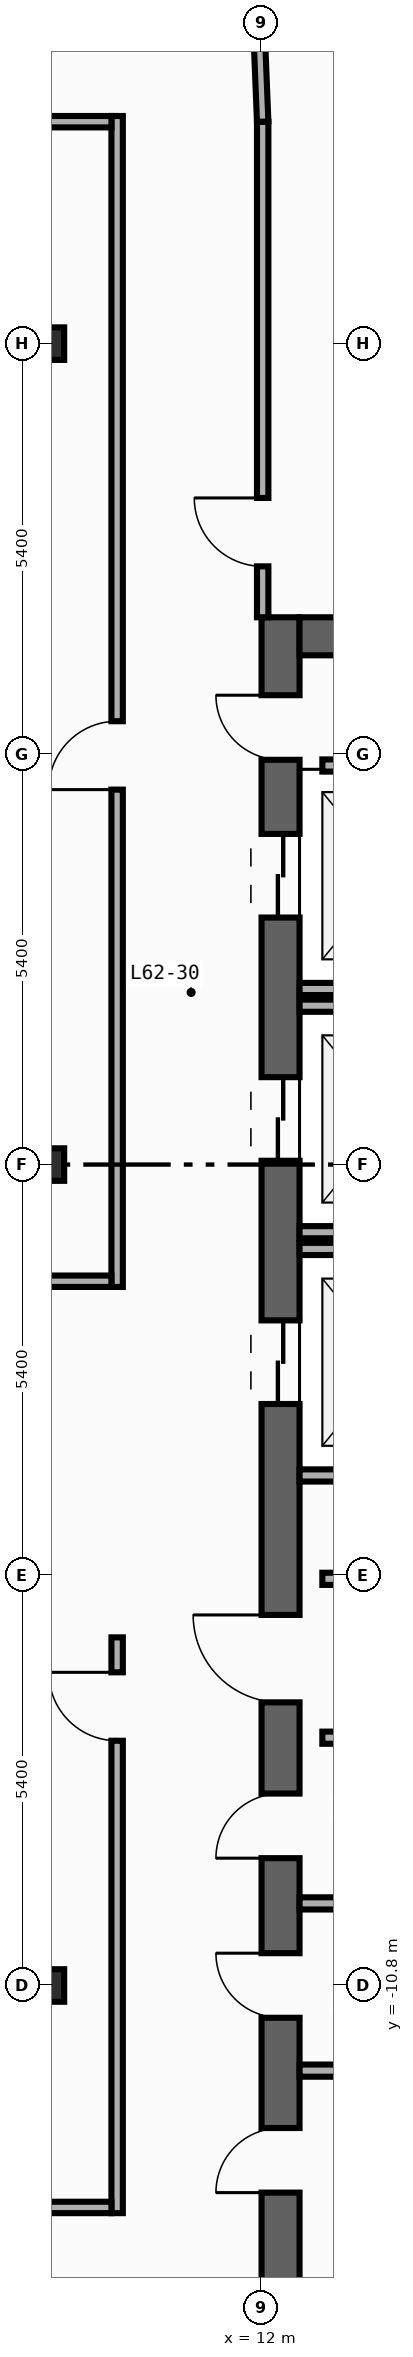
"""IFC4 building model, lengths in metres.
Left out: names, types, materials, properties, quantities, classifications, styles, units other than length and angle.
Written with IfcOpenShell. Run it as: python <this file> out.ifc"""

import sys

from ifc_helpers import new_model, si_unit, direction, frame, frame_2d, origin, origin_2d, place, context, subcontext, project, spatial, rectangle, i_section, extrude, element, fill, save


model = new_model("IFC4")
c1 = context("Model", 3, precision=1e-05, world=origin(), true_north=direction((0.0, 1.0)))
c2 = subcontext(c1, "Body", "Model", "MODEL_VIEW")
j1 = project(units=[si_unit("LENGTHUNIT", "METRE"), si_unit("PLANEANGLEUNIT", "RADIAN")], contexts=[c1])
p1 = place(None, origin())
s1 = spatial("IfcSite", under=j1, at=p1, CompositionType="ELEMENT")
p2 = place(p1, origin())
s2 = spatial("IfcBuilding", under=s1, at=p2, CompositionType="ELEMENT")
p3 = place(p2, frame((0.0, 0.0, 262.0)))
s3 = spatial("IfcBuildingStorey", under=s2, at=p3, CompositionType="ELEMENT", Elevation=262.0)
p4 = place(p3, frame((12.25, -19.8, 0.0), z_axis=(0.0, 0.0, 1.0), x_axis=(0.0, 1.0, 0.0)))
e1 = element("IfcWall", 1, at=p4, inside=s3, PredefinedType="SHEAR", context=c2, shape_type="SweptSolid", body=[
    extrude(rectangle(XDim=27.0, YDim=0.5, at=frame_2d((13.5, 0.0))), origin(), (0.0, 0.0, 1.0), 3.34),
])
p5 = place(p4, frame((23.05, 0.0, 0.0)))
e2 = element("IfcOpeningElement", 2, at=p5, cuts=e1, PredefinedType="OPENING", context=c2, shape_type="SweptSolid", body=[
    extrude(rectangle(XDim=1.1, YDim=2.2, at=frame_2d((0.55, 1.1))), frame((0.0, 0.26, 0.0), z_axis=(0.0, -1.0, 0.0), x_axis=(1.0, 0.0, 0.0)), (0.0, 0.0, 1.0), 0.52),
])
p6 = place(p4, frame((19.85, 0.0, 0.0)))
e3 = element("IfcOpeningElement", 3, at=p6, cuts=e1, PredefinedType="OPENING", context=c2, shape_type="SweptSolid", body=[
    extrude(rectangle(XDim=1.1, YDim=2.2, at=frame_2d((0.55, 1.1))), frame((0.0, 0.26, 0.0), z_axis=(0.0, -1.0, 0.0), x_axis=(1.0, 0.0, 0.0)), (0.0, 0.0, 1.0), 0.52),
])
p7 = place(p4, frame((16.65, 0.0, 0.0)))
e4 = element("IfcOpeningElement", 4, at=p7, cuts=e1, PredefinedType="OPENING", context=c2, shape_type="SweptSolid", body=[
    extrude(rectangle(XDim=1.1, YDim=2.2, at=frame_2d((0.55, 1.1))), frame((0.0, 0.26, 0.0), z_axis=(0.0, -1.0, 0.0), x_axis=(1.0, 0.0, 0.0)), (0.0, 0.0, 1.0), 0.52),
])
p8 = place(p4, frame((6.275, 0.0, 0.0)))
e5 = element("IfcOpeningElement", 5, at=p8, cuts=e1, PredefinedType="OPENING", context=c2, shape_type="SweptSolid", body=[
    extrude(rectangle(XDim=0.85, YDim=2.1, at=frame_2d((0.425, 1.05))), frame((0.0, 0.26, 0.0), z_axis=(0.0, -1.0, 0.0), x_axis=(1.0, 0.0, 0.0)), (0.0, 0.0, 1.0), 0.52),
])
p9 = place(p4, frame((8.575, 0.0, 0.0)))
e6 = element("IfcOpeningElement", 6, at=p9, cuts=e1, PredefinedType="OPENING", context=c2, shape_type="SweptSolid", body=[
    extrude(rectangle(XDim=0.85, YDim=2.1, at=frame_2d((0.425, 1.05))), frame((0.0, 0.26, 0.0), z_axis=(0.0, -1.0, 0.0), x_axis=(1.0, 0.0, 0.0)), (0.0, 0.0, 1.0), 0.52),
])
p10 = place(p4, frame((10.675, 0.0, 0.0)))
e7 = element("IfcOpeningElement", 7, at=p10, cuts=e1, PredefinedType="OPENING", context=c2, shape_type="SweptSolid", body=[
    extrude(rectangle(XDim=0.85, YDim=2.1, at=frame_2d((0.425, 1.05))), frame((0.0, 0.26, 0.0), z_axis=(0.0, -1.0, 0.0), x_axis=(1.0, 0.0, 0.0)), (0.0, 0.0, 1.0), 0.52),
])
p11 = place(p4, frame((12.725, 0.0, 0.0)))
e8 = element("IfcOpeningElement", 8, at=p11, cuts=e1, PredefinedType="OPENING", context=c2, shape_type="SweptSolid", body=[
    extrude(rectangle(XDim=1.15, YDim=2.2, at=frame_2d((0.575, 1.1))), frame((0.0, 0.26, 0.0), z_axis=(0.0, -1.0, 0.0), x_axis=(1.0, 0.0, 0.0)), (0.0, 0.0, 1.0), 0.52),
])
p12 = place(p4, frame((25.125, 0.0, 0.0)))
e9 = element("IfcOpeningElement", 9, at=p12, cuts=e1, PredefinedType="OPENING", context=c2, shape_type="SweptSolid", body=[
    extrude(rectangle(XDim=0.85, YDim=2.1, at=frame_2d((0.425, 1.05))), frame((0.0, 0.26, 0.0), z_axis=(0.0, -1.0, 0.0), x_axis=(1.0, 0.0, 0.0)), (0.0, 0.0, 1.0), 0.52),
])
p13 = place(p3, frame((12.5, 6.95, 0.0), z_axis=(0.0, 0.0, 1.0), x_axis=(1.0, 0.0, 0.0)))
e10 = element("IfcWall", 10, at=p13, inside=s3, PredefinedType="SHEAR", context=c2, shape_type="SweptSolid", body=[
    extrude(rectangle(XDim=7.4, YDim=0.5, at=frame_2d((3.7, 0.0))), origin(), (0.0, 0.0, 1.0), 3.34),
])
for number, where, z_axis, x_axis in (
    (11, (9.2, -10.8, 0.0), (0.0, 0.0, 1.0), (1.0, 0.0, 0.0)),
    (12, (9.2, 0.0, 0.0), (0.0, 0.0, 1.0), (1.0, 0.0, 0.0)),
    (13, (9.2, 10.8, 0.0), (0.0, 0.0, 1.0), (1.0, 0.0, 0.0)),
):
    element("IfcColumn", number, at=place(p3, frame(where, z_axis=z_axis, x_axis=x_axis)), inside=s3, PredefinedType="COLUMN", context=c2, shape_type="SweptSolid", body=[
        extrude(i_section(OverallWidth=0.407, OverallDepth=0.428, WebThickness=0.02, FlangeThickness=0.035, FilletRadius=0.022, at=origin_2d()), origin(), (0.0, 0.0, 1.0), 3.6),
    ])
for number, where, z_axis, x_axis in (
    (14, (12.5, 2.31, 0.0), (0.0, 0.0, 1.0), (1.0, 0.0, 0.0)),
    (15, (12.5, -0.89, 0.0), (0.0, 0.0, 1.0), (1.0, 0.0, 0.0)),
    (16, (12.5, 2.09, 0.0), (0.0, 0.0, 1.0), (1.0, 0.0, 0.0)),
    (17, (12.5, -4.09, 0.0), (0.0, 0.0, 1.0), (1.0, 0.0, 0.0)),
    (18, (12.5, -1.11, 0.0), (0.0, 0.0, 1.0), (1.0, 0.0, 0.0)),
):
    element("IfcWall", number, at=place(p3, frame(where, z_axis=z_axis, x_axis=x_axis)), inside=s3, PredefinedType="STANDARD", context=c2, shape_type="SweptSolid", body=[
        extrude(rectangle(XDim=2.49, YDim=0.16, at=frame_2d((1.245, 0.0))), origin(), (0.0, 0.0, 1.0), 3.34),
    ])
for number, where, z_axis, x_axis in (
    (19, (12.8, -5.45, 0.0), (0.0, 0.0, 1.0), (1.0, 0.0, 0.0)),
    (20, (12.8, -7.54, 0.0), (0.0, 0.0, 1.0), (1.0, 0.0, 0.0)),
    (21, (12.8, 5.25, 0.0), (0.0, 0.0, 1.0), (1.0, 0.0, 0.0)),
):
    element("IfcWall", number, at=place(p3, frame(where, z_axis=z_axis, x_axis=x_axis)), inside=s3, PredefinedType="STANDARD", context=c2, shape_type="SweptSolid", body=[
        extrude(rectangle(XDim=2.6, YDim=0.16, at=frame_2d((1.3, 0.0))), origin(), (0.0, 0.0, 1.0), 3.34),
    ])
for number, where, z_axis, x_axis in (
    (22, (12.5, -11.92, 0.0), (0.0, 0.0, 1.0), (1.0, 0.0, 0.0)),
    (23, (12.5, -9.72, 0.0), (0.0, 0.0, 1.0), (1.0, 0.0, 0.0)),
):
    element("IfcWall", number, at=place(p3, frame(where, z_axis=z_axis, x_axis=x_axis)), inside=s3, PredefinedType="PARTITIONING", context=c2, shape_type="SweptSolid", body=[
        extrude(rectangle(XDim=2.9, YDim=0.16, at=frame_2d((1.45, 0.0))), origin(), (0.0, 0.0, 1.0), 3.34),
    ])
p14 = place(p3, frame((12.015, 7.2, 0.0), z_axis=(0.0, 0.0, 1.0), x_axis=(0.0, 1.0, 0.0)))
e24 = element("IfcWall", 24, at=p14, inside=s3, PredefinedType="PARTITIONING", context=c2, shape_type="SweptSolid", body=[
    extrude(rectangle(XDim=6.52, YDim=0.15, at=frame_2d((3.26, 0.0))), origin(), (0.0, 0.0, 1.0), 3.34),
])
p15 = place(p14, frame((0.67, 0.0, 0.0)))
e25 = element("IfcOpeningElement", 25, at=p15, cuts=e24, PredefinedType="OPENING", context=c2, shape_type="SweptSolid", body=[
    extrude(rectangle(XDim=0.9, YDim=2.15, at=frame_2d((0.45, 1.075))), frame((0.0, 0.085, 0.0), z_axis=(0.0, -1.0, 0.0), x_axis=(1.0, 0.0, 0.0)), (0.0, 0.0, 1.0), 0.17),
])
p16 = place(p3, frame((10.1, -1.61, 0.0), z_axis=(0.0, 0.0, 1.0), x_axis=(0.0, 1.0, 0.0)))
e26 = element("IfcWall", 26, at=p16, inside=s3, PredefinedType="PARTITIONING", context=c2, shape_type="SweptSolid", body=[
    extrude(rectangle(XDim=15.405, YDim=0.15, at=frame_2d((7.703, 0.0))), origin(), (0.0, 0.0, 1.0), 3.34),
])
p17 = place(p16, frame((6.543, 0.0, 0.0)))
e27 = element("IfcOpeningElement", 27, at=p17, cuts=e26, PredefinedType="OPENING", context=c2, shape_type="SweptSolid", body=[
    extrude(rectangle(XDim=0.9, YDim=2.15, at=frame_2d((0.45, 1.075))), frame((0.0, 0.085, 0.0), z_axis=(0.0, -1.0, 0.0), x_axis=(1.0, 0.0, 0.0)), (0.0, 0.0, 1.0), 0.17),
])
p18 = place(p3, frame((10.1, -13.795, 0.0), z_axis=(0.0, 0.0, 1.0), x_axis=(0.0, 1.0, 0.0)))
e28 = element("IfcWall", 28, at=p18, inside=s3, PredefinedType="PARTITIONING", context=c2, shape_type="SweptSolid", body=[
    extrude(rectangle(XDim=7.575, YDim=0.15, at=frame_2d((3.788, 0.0))), origin(), (0.0, 0.0, 1.0), 3.34),
])
p19 = place(p18, frame((6.215, 0.0, 0.0)))
e29 = element("IfcOpeningElement", 29, at=p19, cuts=e28, PredefinedType="OPENING", context=c2, shape_type="SweptSolid", body=[
    extrude(rectangle(XDim=0.9, YDim=2.15, at=frame_2d((0.45, 1.075))), frame((0.0, 0.085, 0.0), z_axis=(0.0, -1.0, 0.0), x_axis=(1.0, 0.0, 0.0)), (0.0, 0.0, 1.0), 0.17),
])
p20 = place(p3, frame((-1.81, -1.535, 0.0), z_axis=(0.0, 0.0, 1.0), x_axis=(1.0, 0.0, 0.0)))
e30 = element("IfcWall", 30, at=p20, inside=s3, PredefinedType="PARTITIONING", context=c2, shape_type="SweptSolid", body=[
    extrude(rectangle(XDim=11.835, YDim=0.15, at=frame_2d((5.917, 0.0))), origin(), (0.0, 0.0, 1.0), 3.34),
])
p21 = place(p20, frame((1.261, 0.0, 0.0)))
e31 = element("IfcOpeningElement", 31, at=p21, cuts=e30, PredefinedType="OPENING", context=c2, shape_type="SweptSolid", body=[
    extrude(rectangle(XDim=0.9, YDim=2.15, at=frame_2d((0.45, 1.075))), frame((0.0, 0.085, 0.0), z_axis=(0.0, -1.0, 0.0), x_axis=(1.0, 0.0, 0.0)), (0.0, 0.0, 1.0), 0.17),
])
p22 = place(p3, frame((12.015, 13.72, 0.0), z_axis=(0.0, 0.0, 1.0), x_axis=(-0.040046877756, 0.99919780203, 0.0)))
e32 = element("IfcWall", 32, at=p22, inside=s3, PredefinedType="PARTITIONING", context=c2, shape_type="SweptSolid", body=[
    extrude(rectangle(XDim=1.731, YDim=0.15, at=frame_2d((0.866, 0.0))), origin(), (0.0, 0.0, 1.0), 3.34),
])
p23 = place(p3, frame((-1.66, 13.72, 0.0), z_axis=(0.0, 0.0, 1.0), x_axis=(1.0, 0.0, 0.0)))
e33 = element("IfcWall", 33, at=p23, inside=s3, PredefinedType="PARTITIONING", context=c2, shape_type="SweptSolid", body=[
    extrude(rectangle(XDim=11.685, YDim=0.15, at=frame_2d((5.842, 0.0))), origin(), (0.0, 0.0, 1.0), 3.34),
])
p24 = place(p23, frame((3.48, 0.0, 0.0)))
e34 = element("IfcOpeningElement", 34, at=p24, cuts=e33, PredefinedType="OPENING", context=c2, shape_type="SweptSolid", body=[
    extrude(rectangle(XDim=0.9, YDim=2.15, at=frame_2d((0.45, 1.075))), frame((0.0, 0.085, 0.0), z_axis=(0.0, -1.0, 0.0), x_axis=(1.0, 0.0, 0.0)), (0.0, 0.0, 1.0), 0.17),
])
p25 = place(p3, frame((-1.83, -13.72, 0.0), z_axis=(0.0, 0.0, 1.0), x_axis=(1.0, 0.0, 0.0)))
e35 = element("IfcWall", 35, at=p25, inside=s3, PredefinedType="PARTITIONING", context=c2, shape_type="SweptSolid", body=[
    extrude(rectangle(XDim=11.855, YDim=0.15, at=frame_2d((5.927, 0.0))), origin(), (0.0, 0.0, 1.0), 3.34),
])
p26 = place(p25, frame((3.671, 0.0, 0.0)))
e36 = element("IfcOpeningElement", 36, at=p26, cuts=e35, PredefinedType="OPENING", context=c2, shape_type="SweptSolid", body=[
    extrude(rectangle(XDim=0.9, YDim=2.15, at=frame_2d((0.45, 1.075))), frame((0.0, 0.085, 0.0), z_axis=(0.0, -1.0, 0.0), x_axis=(1.0, 0.0, 0.0)), (0.0, 0.0, 1.0), 0.17),
])
p27 = place(p5, origin())
e37 = element("IfcDoor", 37, at=p27, inside=s3, OperationType="DOUBLE_DOOR_SLIDING", PredefinedType="DOOR", context=c2, shape_type="SweptSolid", body=[
    extrude(rectangle(XDim=1.1, YDim=2.2, at=frame_2d((0.55, 1.1))), frame((0.0, 0.025, 0.0), z_axis=(0.0, -1.0, 0.0), x_axis=(1.0, 0.0, 0.0)), (0.0, 0.0, 1.0), 0.05),
])
fill(e2, e37)
p28 = place(p6, origin())
e38 = element("IfcDoor", 38, at=p28, inside=s3, OperationType="DOUBLE_DOOR_SLIDING", PredefinedType="DOOR", context=c2, shape_type="SweptSolid", body=[
    extrude(rectangle(XDim=1.1, YDim=2.2, at=frame_2d((0.55, 1.1))), frame((0.0, 0.025, 0.0), z_axis=(0.0, -1.0, 0.0), x_axis=(1.0, 0.0, 0.0)), (0.0, 0.0, 1.0), 0.05),
])
fill(e3, e38)
p29 = place(p7, origin())
e39 = element("IfcDoor", 39, at=p29, inside=s3, OperationType="DOUBLE_DOOR_SLIDING", PredefinedType="DOOR", context=c2, shape_type="SweptSolid", body=[
    extrude(rectangle(XDim=1.1, YDim=2.2, at=frame_2d((0.55, 1.1))), frame((0.0, 0.025, 0.0), z_axis=(0.0, -1.0, 0.0), x_axis=(1.0, 0.0, 0.0)), (0.0, 0.0, 1.0), 0.05),
])
fill(e4, e39)
p30 = place(p8, origin())
e40 = element("IfcDoor", 40, at=p30, inside=s3, OperationType="SINGLE_SWING_LEFT", PredefinedType="DOOR", context=c2, shape_type="SweptSolid", body=[
    extrude(rectangle(XDim=0.85, YDim=2.1, at=frame_2d((0.425, 1.05))), frame((0.0, 0.025, 0.0), z_axis=(0.0, -1.0, 0.0), x_axis=(1.0, 0.0, 0.0)), (0.0, 0.0, 1.0), 0.05),
])
fill(e5, e40)
p31 = place(p9, origin())
e41 = element("IfcDoor", 41, at=p31, inside=s3, OperationType="SINGLE_SWING_RIGHT", PredefinedType="DOOR", context=c2, shape_type="SweptSolid", body=[
    extrude(rectangle(XDim=0.85, YDim=2.1, at=frame_2d((0.425, 1.05))), frame((0.0, 0.025, 0.0), z_axis=(0.0, -1.0, 0.0), x_axis=(1.0, 0.0, 0.0)), (0.0, 0.0, 1.0), 0.05),
])
fill(e6, e41)
p32 = place(p10, origin())
e42 = element("IfcDoor", 42, at=p32, inside=s3, OperationType="SINGLE_SWING_LEFT", PredefinedType="DOOR", context=c2, shape_type="SweptSolid", body=[
    extrude(rectangle(XDim=0.85, YDim=2.1, at=frame_2d((0.425, 1.05))), frame((0.0, 0.025, 0.0), z_axis=(0.0, -1.0, 0.0), x_axis=(1.0, 0.0, 0.0)), (0.0, 0.0, 1.0), 0.05),
])
fill(e7, e42)
p33 = place(p11, origin())
e43 = element("IfcDoor", 43, at=p33, inside=s3, OperationType="SINGLE_SWING_RIGHT", PredefinedType="DOOR", context=c2, shape_type="SweptSolid", body=[
    extrude(rectangle(XDim=1.15, YDim=2.2, at=frame_2d((0.575, 1.1))), frame((0.0, 0.025, 0.0), z_axis=(0.0, -1.0, 0.0), x_axis=(1.0, 0.0, 0.0)), (0.0, 0.0, 1.0), 0.05),
])
fill(e8, e43)
p34 = place(p12, origin())
e44 = element("IfcDoor", 44, at=p34, inside=s3, OperationType="SINGLE_SWING_RIGHT", PredefinedType="DOOR", context=c2, shape_type="SweptSolid", body=[
    extrude(rectangle(XDim=0.85, YDim=2.1, at=frame_2d((0.425, 1.05))), frame((0.0, 0.025, 0.0), z_axis=(0.0, -1.0, 0.0), x_axis=(1.0, 0.0, 0.0)), (0.0, 0.0, 1.0), 0.05),
])
fill(e9, e44)
p35 = place(p15, origin())
e45 = element("IfcDoor", 45, at=p35, inside=s3, OperationType="SINGLE_SWING_RIGHT", PredefinedType="DOOR", context=c2, shape_type="SweptSolid", body=[
    extrude(rectangle(XDim=0.9, YDim=2.15, at=frame_2d((0.45, 1.075))), frame((0.0, 0.025, 0.0), z_axis=(0.0, -1.0, 0.0), x_axis=(1.0, 0.0, 0.0)), (0.0, 0.0, 1.0), 0.05),
])
fill(e25, e45)
p36 = place(p17, origin())
e46 = element("IfcDoor", 46, at=p36, inside=s3, OperationType="SINGLE_SWING_LEFT", PredefinedType="DOOR", context=c2, shape_type="SweptSolid", body=[
    extrude(rectangle(XDim=0.9, YDim=2.15, at=frame_2d((0.45, 1.075))), frame((0.0, 0.025, 0.0), z_axis=(0.0, -1.0, 0.0), x_axis=(1.0, 0.0, 0.0)), (0.0, 0.0, 1.0), 0.05),
])
fill(e27, e46)
p37 = place(p19, origin())
e47 = element("IfcDoor", 47, at=p37, inside=s3, OperationType="SINGLE_SWING_RIGHT", PredefinedType="DOOR", context=c2, shape_type="SweptSolid", body=[
    extrude(rectangle(XDim=0.9, YDim=2.15, at=frame_2d((0.45, 1.075))), frame((0.0, 0.025, 0.0), z_axis=(0.0, -1.0, 0.0), x_axis=(1.0, 0.0, 0.0)), (0.0, 0.0, 1.0), 0.05),
])
fill(e29, e47)
save(model, sys.argv[1])
